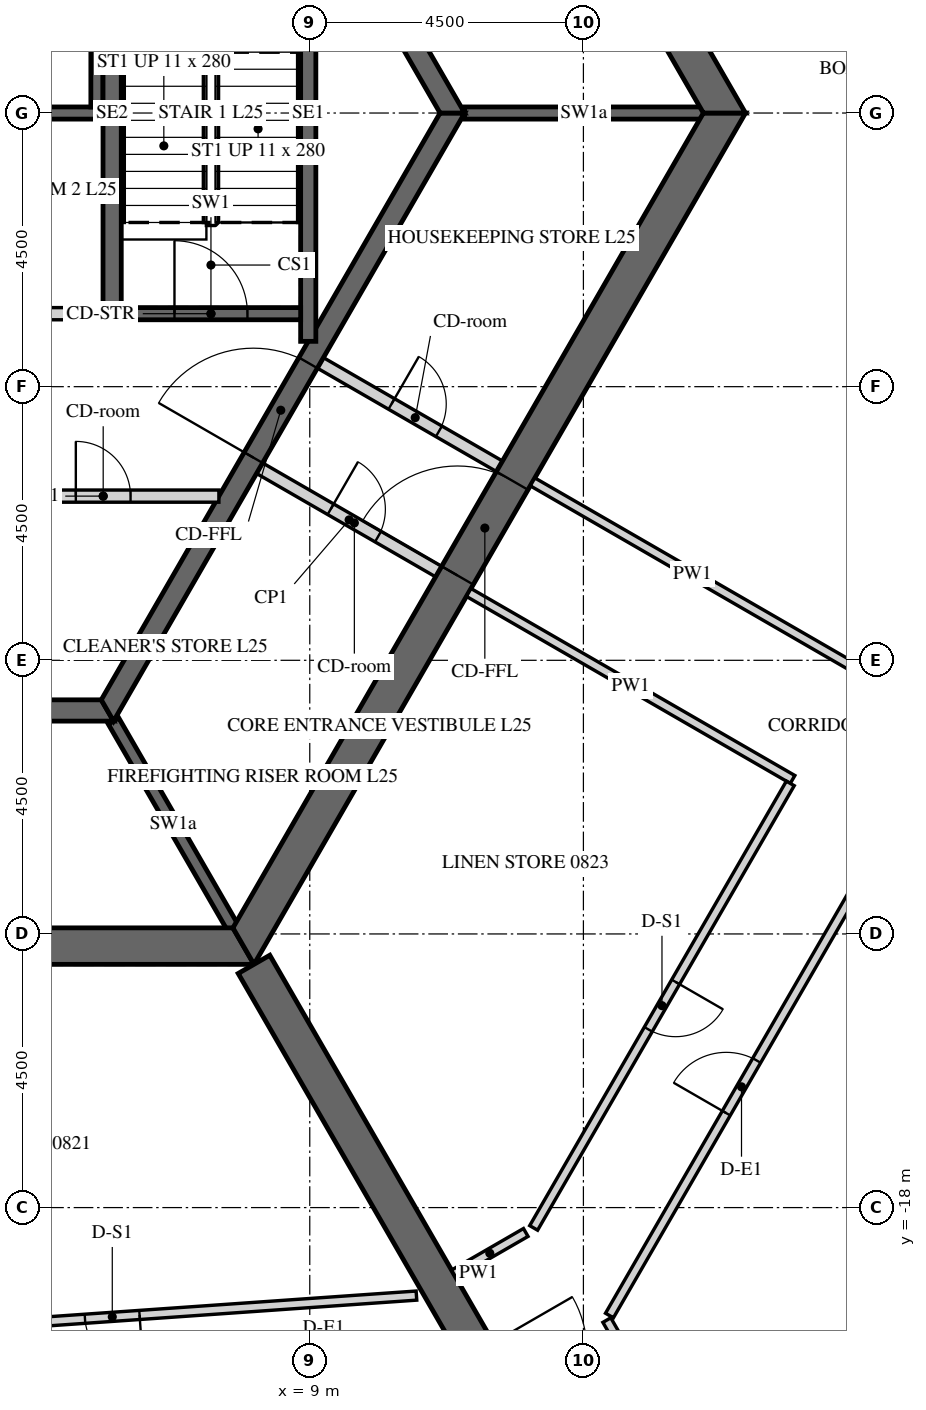
"""IFC4 building model, lengths in metres.
Left out: names, types, materials, properties, quantities, classifications, styles, units other than length and angle.
Written with IfcOpenShell. Run it as: python <this file> out.ifc"""

import sys

from ifc_helpers import new_model, si_unit, direction, frame, frame_2d, origin, place, context, subcontext, project, spatial, polyline, rectangle, outline, extrude, element, fill, save


model = new_model("IFC4")
c1 = context("Model", 3, precision=1e-05, world=origin(), true_north=direction((0.0, 1.0)))
c2 = subcontext(c1, "Body", "Model", "MODEL_VIEW")
j1 = project(units=[si_unit("LENGTHUNIT", "METRE"), si_unit("PLANEANGLEUNIT", "RADIAN")], contexts=[c1])
p1 = place(None, origin())
s1 = spatial("IfcSite", under=j1, at=p1, CompositionType="ELEMENT")
p2 = place(p1, origin())
s2 = spatial("IfcBuilding", under=s1, at=p2, CompositionType="ELEMENT")
p3 = place(p2, frame((0.0, 0.0, 111.6)))
s3 = spatial("IfcBuildingStorey", under=s2, at=p3, CompositionType="ELEMENT", Elevation=111.6)
p4 = place(p3, frame((-7.91, -13.7, -0.15), z_axis=(0.0, 0.0, 1.0), x_axis=(1.0, 0.0, 0.0)))
e1 = element("IfcWall", 1, at=p4, inside=s3, PredefinedType="SHEAR", context=c2, shape_type="SweptSolid", body=[
    extrude(outline(polyline([(-0.173, -0.3), (15.993, -0.3), (15.646, 0.3), (0.173, 0.3), (-0.173, -0.3)])), origin(), (0.0, 0.0, 1.0), 3.9),
])
p5 = place(p4, frame((7.31, 0.0, 0.15)))
e2 = element("IfcOpeningElement", 2, at=p5, cuts=e1, PredefinedType="OPENING", context=c2, shape_type="SweptSolid", body=[
    extrude(rectangle(XDim=1.2, YDim=2.4, at=frame_2d((0.6, 1.2))), frame((0.0, 0.31, 0.0), z_axis=(0.0, -1.0, 0.0), x_axis=(1.0, 0.0, 0.0)), (0.0, 0.0, 1.0), 0.62),
])
p6 = place(p3, frame((7.91, -13.7, -0.15), z_axis=(0.0, 0.0, 1.0), x_axis=(0.499999880136, 0.866025472988, 0.0)))
e3 = element("IfcWall", 3, at=p6, inside=s3, PredefinedType="SHEAR", context=c2, shape_type="SweptSolid", body=[
    extrude(outline(polyline([(-0.173, -0.3), (15.993, -0.3), (15.646, 0.3), (0.173, 0.3), (-0.173, -0.3)])), origin(), (0.0, 0.0, 1.0), 3.9),
])
p7 = place(p6, frame((7.039, 0.0, 0.15)))
e4 = element("IfcOpeningElement", 4, at=p7, cuts=e3, PredefinedType="OPENING", context=c2, shape_type="SweptSolid", body=[
    extrude(rectangle(XDim=1.8, YDim=2.4, at=frame_2d((0.9, 1.2))), frame((0.0, 0.31, 0.0), z_axis=(0.0, -1.0, 0.0), x_axis=(1.0, 0.0, 0.0)), (0.0, 0.0, 1.0), 0.62),
])
p8 = place(p3, frame((15.819, 0.0, -0.15), z_axis=(0.0, 0.0, 1.0), x_axis=(-0.499999880136, 0.866025472988, 0.0)))
e5 = element("IfcWall", 5, at=p8, inside=s3, PredefinedType="SHEAR", context=c2, shape_type="SweptSolid", body=[
    extrude(outline(polyline([(-0.173, -0.3), (15.993, -0.3), (15.646, 0.3), (0.173, 0.3), (-0.173, -0.3)])), origin(), (0.0, 0.0, 1.0), 3.9),
])
p9 = place(p8, frame((6.981, 0.0, 0.15)))
e6 = element("IfcOpeningElement", 6, at=p9, cuts=e5, PredefinedType="OPENING", context=c2, shape_type="SweptSolid", body=[
    extrude(rectangle(XDim=1.8, YDim=2.4, at=frame_2d((0.9, 1.2))), frame((0.0, 0.31, 0.0), z_axis=(0.0, -1.0, 0.0), x_axis=(1.0, 0.0, 0.0)), (0.0, 0.0, 1.0), 0.62),
])
p10 = place(p3, frame((8.083, -14.0, -0.15), z_axis=(0.0, 0.0, 1.0), x_axis=(0.499997680643, -0.866026742862, 0.0)))
e7 = element("IfcWall", 7, at=p10, inside=s3, PredefinedType="SHEAR", context=c2, shape_type="SweptSolid", body=[
    extrude(rectangle(XDim=16.509, YDim=0.6, at=frame_2d((8.254, 0.0))), origin(), (0.0, 0.0, 1.0), 3.9),
])
p11 = place(p10, frame((7.354, 0.0, 0.15)))
e8 = element("IfcOpeningElement", 8, at=p11, cuts=e7, PredefinedType="OPENING", context=c2, shape_type="SweptSolid", body=[
    extrude(rectangle(XDim=1.8, YDim=2.4, at=frame_2d((0.9, 1.2))), frame((0.0, 0.31, 0.0), z_axis=(0.0, -1.0, 0.0), x_axis=(1.0, 0.0, 0.0)), (0.0, 0.0, 1.0), 0.62),
])
p12 = place(p3, frame((-5.673, -9.825, -0.15), z_axis=(0.0, 0.0, 1.0), x_axis=(1.0, 0.0, 0.0)))
e9 = element("IfcWall", 9, at=p12, inside=s3, PredefinedType="SHEAR", context=c2, shape_type="SweptSolid", body=[
    extrude(outline(polyline([(-0.101, -0.175), (11.446, -0.175), (11.244, 0.175), (0.101, 0.175), (-0.101, -0.175)])), origin(), (0.0, 0.0, 1.0), 3.9),
])
p13 = place(p3, frame((5.673, -9.825, -0.15), z_axis=(0.0, 0.0, 1.0), x_axis=(0.499995046907, 0.866028263435, 0.0)))
e10 = element("IfcWall", 10, at=p13, inside=s3, PredefinedType="SHEAR", context=c2, shape_type="SweptSolid", body=[
    extrude(outline(polyline([(-0.101, -0.175), (11.446, -0.175), (11.244, 0.175), (0.101, 0.175), (-0.101, -0.175)])), origin(), (0.0, 0.0, 1.0), 3.9),
])
p14 = place(p13, frame((4.801, 0.0, 0.15)))
e11 = element("IfcOpeningElement", 11, at=p14, cuts=e10, PredefinedType="OPENING", context=c2, shape_type="SweptSolid", body=[
    extrude(rectangle(XDim=1.8, YDim=2.4, at=frame_2d((0.9, 1.2))), frame((0.0, 0.185, 0.0), z_axis=(0.0, -1.0, 0.0), x_axis=(1.0, 0.0, 0.0)), (0.0, 0.0, 1.0), 0.37),
])
p15 = place(p3, frame((11.345, 0.0, -0.15), z_axis=(0.0, 0.0, 1.0), x_axis=(-0.499995046907, 0.866028263435, 0.0)))
e12 = element("IfcWall", 12, at=p15, inside=s3, PredefinedType="SHEAR", context=c2, shape_type="SweptSolid", body=[
    extrude(outline(polyline([(-0.101, -0.175), (11.446, -0.175), (11.244, 0.175), (0.101, 0.175), (-0.101, -0.175)])), origin(), (0.0, 0.0, 1.0), 3.9),
])
p16 = place(p15, frame((4.744, 0.0, 0.15)))
e13 = element("IfcOpeningElement", 13, at=p16, cuts=e12, PredefinedType="OPENING", context=c2, shape_type="SweptSolid", body=[
    extrude(rectangle(XDim=1.8, YDim=2.4, at=frame_2d((0.9, 1.2))), frame((0.0, 0.185, 0.0), z_axis=(0.0, -1.0, 0.0), x_axis=(1.0, 0.0, 0.0)), (0.0, 0.0, 1.0), 0.37),
])
p17 = place(p3, frame((-5.6, 0.0, -0.25), z_axis=(0.0, 0.0, 1.0), x_axis=(1.0, 0.0, 0.0)))
e14 = element("IfcWall", 14, at=p17, inside=s3, PredefinedType="SHEAR", context=c2, shape_type="SweptSolid", body=[
    extrude(rectangle(XDim=11.2, YDim=0.2, at=frame_2d((5.6, 0.0))), origin(), (0.0, 0.0, 1.0), 3.9),
])
p18 = place(p3, frame((5.5, 0.1, -0.25), z_axis=(0.0, 0.0, 1.0), x_axis=(0.0, 1.0, 0.0)))
e15 = element("IfcWall", 15, at=p18, inside=s3, PredefinedType="SHEAR", context=c2, shape_type="SweptSolid", body=[
    extrude(rectangle(XDim=3.1, YDim=0.2, at=frame_2d((1.55, 0.0))), origin(), (0.0, 0.0, 1.0), 3.9),
])
p19 = place(p3, frame((0.1, -3.3, 0.0), z_axis=(0.0, 0.0, 1.0), x_axis=(1.0, 0.0, 0.0)))
e16 = element("IfcWall", 16, at=p19, inside=s3, PredefinedType="PARTITIONING", context=c2, shape_type="SweptSolid", body=[
    extrude(rectangle(XDim=5.5, YDim=0.2, at=frame_2d((2.75, 0.0))), origin(), (0.0, 0.0, 1.0), 3.65),
])
p20 = place(p19, frame((2.3, 0.0, 0.0)))
e17 = element("IfcOpeningElement", 17, at=p20, cuts=e16, PredefinedType="OPENING", context=c2, shape_type="SweptSolid", body=[
    extrude(rectangle(XDim=0.9, YDim=2.1, at=frame_2d((0.45, 1.05))), frame((0.0, 0.11, 0.0), z_axis=(0.0, -1.0, 0.0), x_axis=(1.0, 0.0, 0.0)), (0.0, 0.0, 1.0), 0.22),
])
p21 = place(p3, frame((3.7, -6.3, 0.0), z_axis=(0.0, 0.0, 1.0), x_axis=(1.0, 0.0, 0.0)))
e18 = element("IfcWall", 18, at=p21, inside=s3, PredefinedType="PARTITIONING", context=c2, shape_type="SweptSolid", body=[
    extrude(rectangle(XDim=3.806, YDim=0.2, at=frame_2d((1.903, 0.0))), origin(), (0.0, 0.0, 1.0), 3.65),
])
p22 = place(p21, frame((1.453, 0.0, 0.0)))
e19 = element("IfcOpeningElement", 19, at=p22, cuts=e18, PredefinedType="OPENING", context=c2, shape_type="SweptSolid", body=[
    extrude(rectangle(XDim=0.9, YDim=2.1, at=frame_2d((0.45, 1.05))), frame((0.0, 0.11, 0.0), z_axis=(0.0, -1.0, 0.0), x_axis=(1.0, 0.0, 0.0)), (0.0, 0.0, 1.0), 0.22),
])
p23 = place(p3, frame((11.547, 0.0, -0.15), z_axis=(0.0, 0.0, 1.0), x_axis=(1.0, 0.0, 0.0)))
e20 = element("IfcWall", 20, at=p23, inside=s3, PredefinedType="SHEAR", context=c2, shape_type="SweptSolid", body=[
    extrude(rectangle(XDim=3.926, YDim=0.2, at=frame_2d((1.963, 0.0))), origin(), (0.0, 0.0, 1.0), 3.9),
])
p24 = place(p3, frame((5.773, -10.0, -0.15), z_axis=(0.0, 0.0, 1.0), x_axis=(0.500038251005, -0.86600331843, 0.0)))
e21 = element("IfcWall", 21, at=p24, inside=s3, PredefinedType="SHEAR", context=c2, shape_type="SweptSolid", body=[
    extrude(rectangle(XDim=3.926, YDim=0.2, at=frame_2d((1.963, 0.0))), origin(), (0.0, 0.0, 1.0), 3.9),
])
p25 = place(p3, frame((9.175, -4.109, 0.0), z_axis=(0.0, 0.0, 1.0), x_axis=(0.865989465428, -0.500062241894, 0.0)))
e22 = element("IfcWall", 22, at=p25, inside=s3, PredefinedType="PARTITIONING", context=c2, shape_type="SweptSolid", body=[
    extrude(rectangle(XDim=3.4, YDim=0.2, at=frame_2d((1.7, 0.0))), origin(), (0.0, 0.0, 1.0), 3.65),
])
p26 = place(p25, frame((1.351, 0.0, 0.0)))
e23 = element("IfcOpeningElement", 23, at=p26, cuts=e22, PredefinedType="OPENING", context=c2, shape_type="SweptSolid", body=[
    extrude(rectangle(XDim=0.9, YDim=2.1, at=frame_2d((0.45, 1.05))), frame((0.0, 0.11, 0.0), z_axis=(0.0, -1.0, 0.0), x_axis=(1.0, 0.0, 0.0)), (0.0, 0.0, 1.0), 0.22),
])
p27 = place(p3, frame((8.175, -5.841, 0.0), z_axis=(0.0, 0.0, 1.0), x_axis=(0.866020560687, -0.500008388397, 0.0)))
e24 = element("IfcWall", 24, at=p27, inside=s3, PredefinedType="PARTITIONING", context=c2, shape_type="SweptSolid", body=[
    extrude(rectangle(XDim=3.4, YDim=0.2, at=frame_2d((1.7, 0.0))), origin(), (0.0, 0.0, 1.0), 3.65),
])
p28 = place(p27, frame((1.35, 0.0, 0.0)))
e25 = element("IfcOpeningElement", 25, at=p28, cuts=e24, PredefinedType="OPENING", context=c2, shape_type="SweptSolid", body=[
    extrude(rectangle(XDim=0.9, YDim=2.1, at=frame_2d((0.45, 1.05))), frame((0.0, 0.11, 0.0), z_axis=(0.0, -1.0, 0.0), x_axis=(1.0, 0.0, 0.0)), (0.0, 0.0, 1.0), 0.22),
])
p29 = place(p3, frame((5.75, -3.4, -0.25), z_axis=(0.0, 0.0, 1.0), x_axis=(0.0, 1.0, 0.0)))
e26 = element("IfcWall", 26, at=p29, inside=s3, PredefinedType="SHEAR", context=c2, shape_type="SweptSolid", body=[
    extrude(rectangle(XDim=6.8, YDim=0.3, at=frame_2d((3.4, 0.0))), origin(), (0.0, 0.0, 1.0), 3.9),
])
p30 = place(p3, frame((8.975, -3.755, -0.25), z_axis=(0.0, 0.0, 1.0), x_axis=(0.0, 1.0, 0.0)))
e27 = element("IfcWall", 27, at=p30, inside=s3, PredefinedType="SHEAR", context=c2, shape_type="SweptSolid", body=[
    extrude(rectangle(XDim=7.51, YDim=0.25, at=frame_2d((3.755, 0.0))), origin(), (0.0, 0.0, 1.0), 3.9),
])
p31 = place(p3, frame((5.9, -3.3, -0.25), z_axis=(0.0, 0.0, 1.0), x_axis=(1.0, 0.0, 0.0)))
e28 = element("IfcWall", 28, at=p31, inside=s3, PredefinedType="SHEAR", context=c2, shape_type="SweptSolid", body=[
    extrude(rectangle(XDim=2.95, YDim=0.2, at=frame_2d((1.475, 0.0))), origin(), (0.0, 0.0, 1.0), 3.9),
])
p32 = place(p31, frame((0.875, 0.0, 0.25)))
e29 = element("IfcOpeningElement", 29, at=p32, cuts=e28, PredefinedType="OPENING", context=c2, shape_type="SweptSolid", body=[
    extrude(rectangle(XDim=1.2, YDim=2.4, at=frame_2d((0.6, 1.2))), frame((0.0, 0.11, 0.0), z_axis=(0.0, -1.0, 0.0), x_axis=(1.0, 0.0, 0.0)), (0.0, 0.0, 1.0), 0.22),
])
p33 = place(p3, frame((10.754, -19.447, 0.0), z_axis=(0.0, 0.0, 1.0), x_axis=(-0.997564830966, -0.069745308232, 0.0)))
e30 = element("IfcWall", 30, at=p33, inside=s3, PredefinedType="PARTITIONING", context=c2, shape_type="SweptSolid", body=[
    extrude(rectangle(XDim=10.029, YDim=0.15, at=frame_2d((5.014, 0.0))), origin(), (0.0, 0.0, 1.0), 2.988),
])
p34 = place(p33, frame((4.564, 0.0, 0.0)))
e31 = element("IfcOpeningElement", 31, at=p34, cuts=e30, PredefinedType="OPENING", context=c2, shape_type="SweptSolid", body=[
    extrude(rectangle(XDim=0.9, YDim=2.1, at=frame_2d((0.45, 1.05))), frame((0.0, 0.085, 0.0), z_axis=(0.0, -1.0, 0.0), x_axis=(1.0, 0.0, 0.0)), (0.0, 0.0, 1.0), 0.17),
])
p35 = place(p3, frame((15.441, -22.545, 0.0), z_axis=(0.0, 0.0, 1.0), x_axis=(-0.500037089193, 0.86600398927, 0.0)))
e32 = element("IfcWall", 32, at=p35, inside=s3, PredefinedType="PARTITIONING", context=c2, shape_type="SweptSolid", body=[
    extrude(rectangle(XDim=3.112, YDim=0.15, at=frame_2d((1.556, 0.0))), origin(), (0.0, 0.0, 1.0), 2.988),
])
p36 = place(p3, frame((13.928, -19.775, 0.0), z_axis=(0.0, 0.0, 1.0), x_axis=(0.50000450071, 0.866022805283, 0.0)))
e33 = element("IfcWall", 33, at=p36, inside=s3, PredefinedType="PARTITIONING", context=c2, shape_type="SweptSolid", body=[
    extrude(rectangle(XDim=23.877, YDim=0.15, at=frame_2d((11.938, 0.0))), origin(), (0.0, 0.0, 1.0), 2.988),
])
p37 = place(p36, frame((3.843, 0.0, 0.0)))
e34 = element("IfcOpeningElement", 34, at=p37, cuts=e33, PredefinedType="OPENING", context=c2, shape_type="SweptSolid", body=[
    extrude(rectangle(XDim=1.0, YDim=2.1, at=frame_2d((0.5, 1.05))), frame((0.0, 0.085, 0.0), z_axis=(0.0, -1.0, 0.0), x_axis=(1.0, 0.0, 0.0)), (0.0, 0.0, 1.0), 0.17),
])
p38 = place(p36, frame((18.425, 0.0, 0.0)))
e35 = element("IfcOpeningElement", 35, at=p38, cuts=e33, PredefinedType="OPENING", context=c2, shape_type="SweptSolid", body=[
    extrude(rectangle(XDim=1.0, YDim=2.1, at=frame_2d((0.5, 1.05))), frame((0.0, 0.085, 0.0), z_axis=(0.0, -1.0, 0.0), x_axis=(1.0, 0.0, 0.0)), (0.0, 0.0, 1.0), 0.17),
])
p39 = place(p3, frame((25.821, 0.972, 0.0), z_axis=(0.0, 0.0, 1.0), x_axis=(-0.559192946342, 0.829037543638, 0.0)))
e36 = element("IfcWall", 36, at=p39, inside=s3, PredefinedType="PARTITIONING", context=c2, shape_type="SweptSolid", body=[
    extrude(rectangle(XDim=21.918, YDim=0.15, at=frame_2d((10.959, 0.0))), origin(), (0.0, 0.0, 1.0), 2.988),
])
p40 = place(p39, frame((6.969, 0.0, 0.0)))
e37 = element("IfcOpeningElement", 37, at=p40, cuts=e36, PredefinedType="OPENING", context=c2, shape_type="SweptSolid", body=[
    extrude(rectangle(XDim=1.0, YDim=2.1, at=frame_2d((0.5, 1.05))), frame((0.0, 0.085, 0.0), z_axis=(0.0, -1.0, 0.0), x_axis=(1.0, 0.0, 0.0)), (0.0, 0.0, 1.0), 0.17),
])
p41 = place(p39, frame((15.511, 0.0, 0.0)))
e38 = element("IfcOpeningElement", 38, at=p41, cuts=e36, PredefinedType="OPENING", context=c2, shape_type="SweptSolid", body=[
    extrude(rectangle(XDim=1.0, YDim=2.1, at=frame_2d((0.5, 1.05))), frame((0.0, 0.085, 0.0), z_axis=(0.0, -1.0, 0.0), x_axis=(1.0, 0.0, 0.0)), (0.0, 0.0, 1.0), 0.17),
])
p42 = place(p3, frame((17.925, -9.103, 0.0), z_axis=(0.0, 0.0, 1.0), x_axis=(-0.866013586754, 0.500020467139, 0.0)))
e39 = element("IfcWall", 39, at=p42, inside=s3, PredefinedType="PARTITIONING", context=c2, shape_type="SweptSolid", body=[
    extrude(rectangle(XDim=6.075, YDim=0.15, at=frame_2d((3.038, 0.0))), origin(), (0.0, 0.0, 1.0), 2.988),
])
p43 = place(p3, frame((11.614, -7.884, 0.0), z_axis=(0.0, 0.0, 1.0), x_axis=(0.866033542371, -0.499985903289, 0.0)))
e40 = element("IfcWall", 40, at=p43, inside=s3, PredefinedType="PARTITIONING", context=c2, shape_type="SweptSolid", body=[
    extrude(rectangle(XDim=6.15, YDim=0.15, at=frame_2d((3.075, 0.0))), origin(), (0.0, 0.0, 1.0), 2.988),
])
p44 = place(p3, frame((16.902, -11.024, 0.0), z_axis=(0.0, 0.0, 1.0), x_axis=(-0.499999527968, -0.866025676312, 0.0)))
e41 = element("IfcWall", 41, at=p44, inside=s3, PredefinedType="PARTITIONING", context=c2, shape_type="SweptSolid", body=[
    extrude(rectangle(XDim=8.441, YDim=0.15, at=frame_2d((4.22, 0.0))), origin(), (0.0, 0.0, 1.0), 2.988),
])
p45 = place(p44, frame((3.771, 0.0, 0.0)))
e42 = element("IfcOpeningElement", 42, at=p45, cuts=e41, PredefinedType="OPENING", context=c2, shape_type="SweptSolid", body=[
    extrude(rectangle(XDim=0.9, YDim=2.1, at=frame_2d((0.45, 1.05))), frame((0.0, 0.085, 0.0), z_axis=(0.0, -1.0, 0.0), x_axis=(1.0, 0.0, 0.0)), (0.0, 0.0, 1.0), 0.17),
])
p46 = place(p3, frame((12.552, -18.409, 0.0), z_axis=(0.0, 0.0, 1.0), x_axis=(-0.866078408764, -0.499908181442, 0.0)))
e43 = element("IfcWall", 43, at=p46, inside=s3, PredefinedType="PARTITIONING", context=c2, shape_type="SweptSolid", body=[
    extrude(rectangle(XDim=1.365, YDim=0.15, at=frame_2d((0.683, 0.0))), origin(), (0.0, 0.0, 1.0), 2.988),
])
p47 = place(p3, frame((15.617, -26.45, 0.0), z_axis=(0.0, 0.0, 1.0), x_axis=(0.499984630745, 0.866034277046, 0.0)))
e44 = element("IfcWall", 44, at=p47, inside=s3, PredefinedType="PARTITIONING", context=c2, shape_type="SweptSolid", body=[
    extrude(rectangle(XDim=9.109, YDim=0.1, at=frame_2d((4.554, 0.0))), origin(), (0.0, 0.0, 1.0), 2.988),
])
p48 = place(p47, frame((5.059, 0.0, 0.0)))
e45 = element("IfcOpeningElement", 45, at=p48, cuts=e44, PredefinedType="OPENING", context=c2, shape_type="SweptSolid", body=[
    extrude(rectangle(XDim=0.9, YDim=2.1, at=frame_2d((0.45, 1.05))), frame((0.0, 0.06, 0.0), z_axis=(0.0, -1.0, 0.0), x_axis=(1.0, 0.0, 0.0)), (0.0, 0.0, 1.0), 0.12),
])
p49 = place(p7, origin())
e46 = element("IfcDoor", 46, at=p49, inside=s3, OperationType="DOUBLE_DOOR_SINGLE_SWING", PredefinedType="DOOR", context=c2, shape_type="SweptSolid", body=[
    extrude(rectangle(XDim=1.8, YDim=2.4, at=frame_2d((0.9, 1.2))), frame((0.0, 0.025, 0.0), z_axis=(0.0, -1.0, 0.0), x_axis=(1.0, 0.0, 0.0)), (0.0, 0.0, 1.0), 0.05),
])
fill(e4, e46)
p50 = place(p14, origin())
e47 = element("IfcDoor", 47, at=p50, inside=s3, OperationType="DOUBLE_DOOR_SINGLE_SWING", PredefinedType="DOOR", context=c2, shape_type="SweptSolid", body=[
    extrude(rectangle(XDim=1.8, YDim=2.4, at=frame_2d((0.9, 1.2))), frame((0.0, 0.025, 0.0), z_axis=(0.0, -1.0, 0.0), x_axis=(1.0, 0.0, 0.0)), (0.0, 0.0, 1.0), 0.05),
])
fill(e11, e47)
p51 = place(p22, origin())
e48 = element("IfcDoor", 48, at=p51, inside=s3, OperationType="SINGLE_SWING_LEFT", PredefinedType="DOOR", context=c2, shape_type="SweptSolid", body=[
    extrude(rectangle(XDim=0.9, YDim=2.1, at=frame_2d((0.45, 1.05))), frame((0.0, 0.025, 0.0), z_axis=(0.0, -1.0, 0.0), x_axis=(1.0, 0.0, 0.0)), (0.0, 0.0, 1.0), 0.05),
])
fill(e19, e48)
p52 = place(p26, origin())
e49 = element("IfcDoor", 49, at=p52, inside=s3, OperationType="SINGLE_SWING_LEFT", PredefinedType="DOOR", context=c2, shape_type="SweptSolid", body=[
    extrude(rectangle(XDim=0.9, YDim=2.1, at=frame_2d((0.45, 1.05))), frame((0.0, 0.025, 0.0), z_axis=(0.0, -1.0, 0.0), x_axis=(1.0, 0.0, 0.0)), (0.0, 0.0, 1.0), 0.05),
])
fill(e23, e49)
p53 = place(p28, origin())
e50 = element("IfcDoor", 50, at=p53, inside=s3, OperationType="SINGLE_SWING_LEFT", PredefinedType="DOOR", context=c2, shape_type="SweptSolid", body=[
    extrude(rectangle(XDim=0.9, YDim=2.1, at=frame_2d((0.45, 1.05))), frame((0.0, 0.025, 0.0), z_axis=(0.0, -1.0, 0.0), x_axis=(1.0, 0.0, 0.0)), (0.0, 0.0, 1.0), 0.05),
])
fill(e25, e50)
p54 = place(p32, origin())
e51 = element("IfcDoor", 51, at=p54, inside=s3, OperationType="SINGLE_SWING_LEFT", PredefinedType="DOOR", context=c2, shape_type="SweptSolid", body=[
    extrude(rectangle(XDim=1.2, YDim=2.4, at=frame_2d((0.6, 1.2))), frame((0.0, 0.025, 0.0), z_axis=(0.0, -1.0, 0.0), x_axis=(1.0, 0.0, 0.0)), (0.0, 0.0, 1.0), 0.05),
])
fill(e29, e51)
p55 = place(p37, origin())
e52 = element("IfcDoor", 52, at=p55, inside=s3, OperationType="SINGLE_SWING_RIGHT", PredefinedType="DOOR", context=c2, shape_type="SweptSolid", body=[
    extrude(rectangle(XDim=1.0, YDim=2.1, at=frame_2d((0.5, 1.05))), frame((0.0, 0.025, 0.0), z_axis=(0.0, -1.0, 0.0), x_axis=(1.0, 0.0, 0.0)), (0.0, 0.0, 1.0), 0.05),
])
fill(e34, e52)
p56 = place(p34, origin())
e53 = element("IfcDoor", 53, at=p56, inside=s3, OperationType="SINGLE_SWING_LEFT", PredefinedType="DOOR", context=c2, shape_type="SweptSolid", body=[
    extrude(rectangle(XDim=0.9, YDim=2.1, at=frame_2d((0.45, 1.05))), frame((0.0, 0.025, 0.0), z_axis=(0.0, -1.0, 0.0), x_axis=(1.0, 0.0, 0.0)), (0.0, 0.0, 1.0), 0.05),
])
fill(e31, e53)
p57 = place(p45, origin())
e54 = element("IfcDoor", 54, at=p57, inside=s3, OperationType="SINGLE_SWING_RIGHT", PredefinedType="DOOR", context=c2, shape_type="SweptSolid", body=[
    extrude(rectangle(XDim=0.9, YDim=2.1, at=frame_2d((0.45, 1.05))), frame((0.0, 0.025, 0.0), z_axis=(0.0, -1.0, 0.0), x_axis=(1.0, 0.0, 0.0)), (0.0, 0.0, 1.0), 0.05),
])
fill(e42, e54)
save(model, sys.argv[1])
